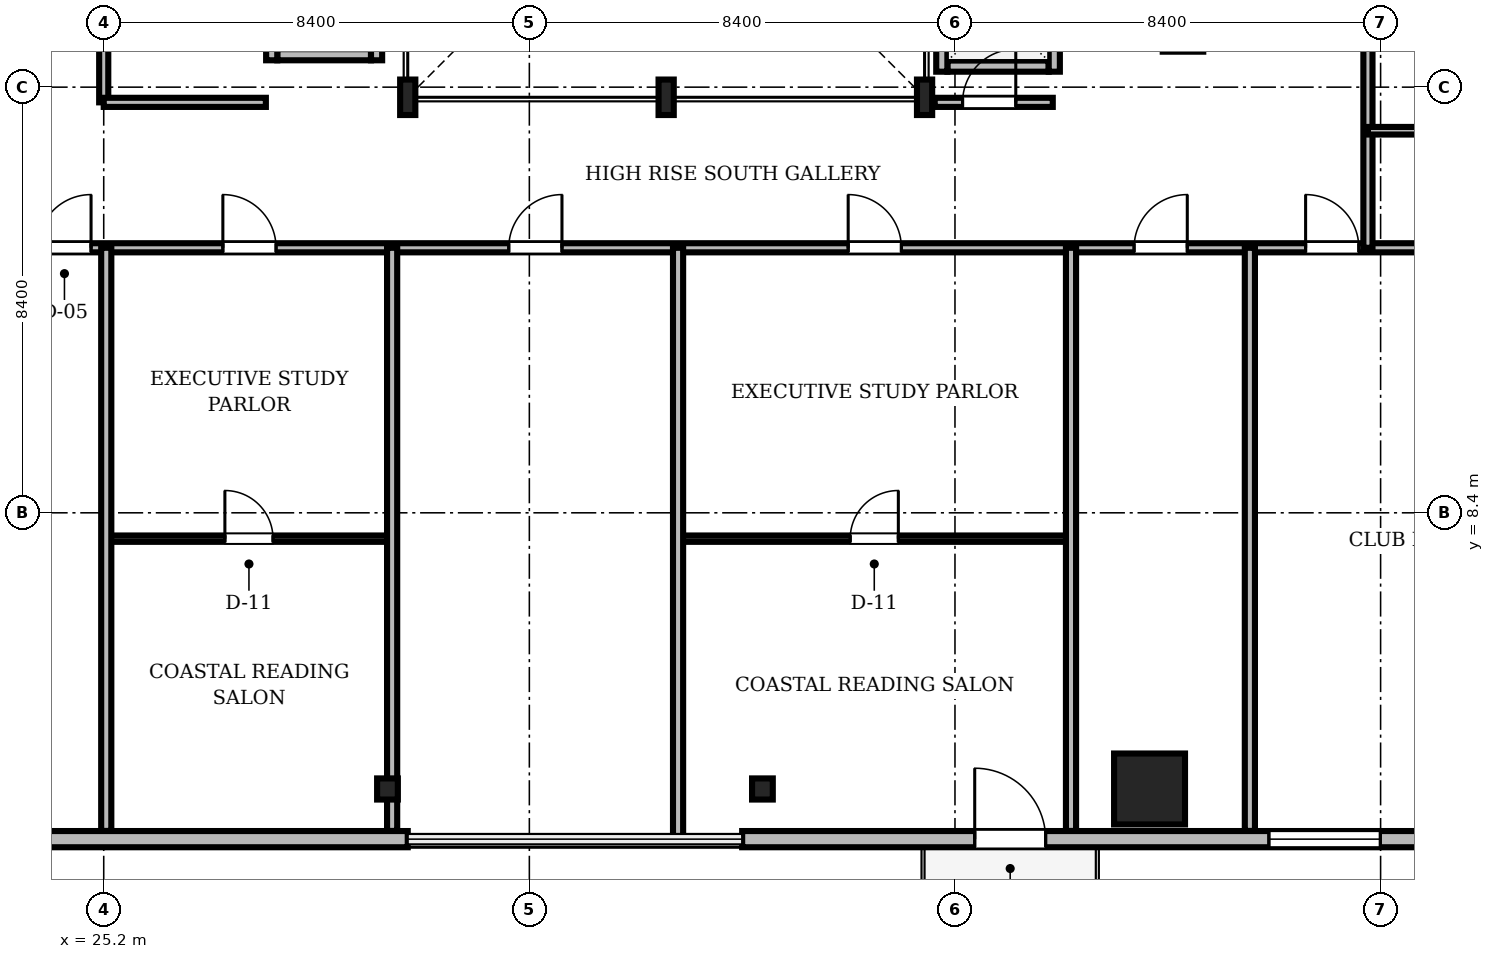
"""IFC4 building model, lengths in metres.
Left out: names, types, materials, properties, quantities, classifications, styles, units other than length and angle.
Written with IfcOpenShell. Run it as: python <this file> out.ifc"""

import sys

from ifc_helpers import new_model, si_unit, direction, frame, frame_2d, origin, origin_2d, place, context, subcontext, project, spatial, rectangle, i_section, extrude, source, transform, mapped, element, fill, save


model = new_model("IFC4")
c1 = context("Model", 3, precision=1e-05, world=origin(), true_north=direction((0.0, 1.0)))
c2 = subcontext(c1, "Body", "Model", "MODEL_VIEW")
j1 = project(units=[si_unit("LENGTHUNIT", "METRE"), si_unit("PLANEANGLEUNIT", "RADIAN")], contexts=[c1])
p1 = place(None, origin())
s1 = spatial("IfcSite", under=j1, at=p1, CompositionType="ELEMENT")
p2 = place(p1, origin())
s2 = spatial("IfcBuilding", under=s1, at=p2, CompositionType="ELEMENT")
p3 = place(p2, frame((0.0, 0.0, 229.8)))
s3 = spatial("IfcBuildingStorey", under=s2, at=p3, CompositionType="ELEMENT", Elevation=229.8)
m1 = source(origin(), c2, "Body", "SweptSolid", [
    extrude(i_section(OverallWidth=0.3, OverallDepth=0.7, WebThickness=0.017, FlangeThickness=0.032, FilletRadius=0.027, at=origin_2d()), origin(), (0.0, 0.0, 1.0), 3.53),
])
for number, where, z_axis, x_axis in (
    (1, (31.2, 16.6, 0.0), (0.0, 0.0, 1.0), (1.0, 0.0, 0.0)),
    (2, (36.3, 16.6, 0.0), (0.0, 0.0, 1.0), (1.0, 0.0, 0.0)),
    (3, (41.4, 16.6, 0.0), (0.0, 0.0, 1.0), (1.0, 0.0, 0.0)),
):
    element("IfcColumn", number, at=place(p3, frame(where, z_axis=z_axis, x_axis=x_axis)), inside=s3, PredefinedType="COLUMN", context=c2, shape_type="MappedRepresentation", body=[
        mapped(m1, transform((0.0, 0.0, 0.0), scale=1.0)),
    ])
m2 = source(origin(), c2, "Body", "SweptSolid", [
    extrude(rectangle(XDim=1.4, YDim=1.4, at=origin_2d()), origin(), (0.0, 0.0, 1.0), 3.53),
])
p4 = place(p3, frame((45.84, 2.95, 0.0), z_axis=(0.0, 0.0, 1.0), x_axis=(1.0, 0.0, 0.0)))
e4 = element("IfcColumn", 4, at=p4, inside=s3, PredefinedType="COLUMN", context=c2, shape_type="MappedRepresentation", body=[
    mapped(m2, transform((0.0, 0.0, 0.0), scale=1.0)),
])
m3 = source(origin(), c2, "Body", "SweptSolid", [
    extrude(i_section(OverallWidth=0.409, OverallDepth=0.417, WebThickness=0.021, FlangeThickness=0.033, FilletRadius=0.015, at=origin_2d()), origin(), (0.0, 0.0, 1.0), 3.53),
])
for number, where, z_axis, x_axis in (
    (5, (30.8, 2.95, 0.0), (0.0, 0.0, 1.0), (1.0, 0.0, 0.0)),
    (6, (38.2, 2.95, 0.0), (0.0, 0.0, 1.0), (1.0, 0.0, 0.0)),
):
    element("IfcColumn", number, at=place(p3, frame(where, z_axis=z_axis, x_axis=x_axis)), inside=s3, PredefinedType="COLUMN", context=c2, shape_type="MappedRepresentation", body=[
        mapped(m3, transform((0.0, 0.0, 0.0), scale=1.0)),
    ])
m4 = source(origin(), c2, "Body", "SweptSolid", [
    extrude(rectangle(XDim=15.6, YDim=0.32, at=frame_2d((7.8, 0.0))), origin(), (0.0, 0.0, 1.0), 3.53),
])
p5 = place(p3, frame((15.6, 1.96, 0.0), z_axis=(0.0, 0.0, 1.0), x_axis=(1.0, 0.0, 0.0)))
e7 = element("IfcWall", 7, at=p5, inside=s3, PredefinedType="SOLIDWALL", context=c2, shape_type="MappedRepresentation", body=[
    mapped(m4, transform((0.0, 0.0, 0.0), scale=1.0)),
])
m5 = source(origin(), c2, "Body", "SweptSolid", [
    extrude(rectangle(XDim=2.2, YDim=2.4, at=frame_2d((1.1, 1.2))), frame((0.0, 0.17, 0.0), z_axis=(0.0, -1.0, 0.0), x_axis=(1.0, 0.0, 0.0)), (0.0, 0.0, 1.0), 0.34),
])
p6 = place(p5, frame((3.005, 0.0, 0.72)))
e8 = element("IfcOpeningElement", 8, at=p6, cuts=e7, PredefinedType="OPENING", context=c2, shape_type="MappedRepresentation", body=[
    mapped(m5, transform((0.0, 0.0, 0.0), scale=1.0)),
])
p7 = place(p3, frame((37.8, 1.96, 0.0), z_axis=(0.0, 0.0, 1.0), x_axis=(1.0, 0.0, 0.0)))
e9 = element("IfcWall", 9, at=p7, inside=s3, PredefinedType="SOLIDWALL", context=c2, shape_type="MappedRepresentation", body=[
    mapped(m4, transform((0.0, 0.0, 0.0), scale=1.0)),
])
m6 = source(origin(), c2, "Body", "SweptSolid", [
    extrude(rectangle(XDim=1.4, YDim=2.3, at=frame_2d((0.7, 1.15))), frame((0.0, 0.17, 0.0), z_axis=(0.0, -1.0, 0.0), x_axis=(1.0, 0.0, 0.0)), (0.0, 0.0, 1.0), 0.34),
])
p8 = place(p7, frame((4.59, 0.0, 0.0)))
e10 = element("IfcOpeningElement", 10, at=p8, cuts=e9, PredefinedType="OPENING", context=c2, shape_type="MappedRepresentation", body=[
    mapped(m6, transform((0.0, 0.0, 0.0), scale=1.0)),
])
p9 = place(p7, frame((10.395, 0.0, 0.72)))
e11 = element("IfcOpeningElement", 11, at=p9, cuts=e9, PredefinedType="OPENING", context=c2, shape_type="MappedRepresentation", body=[
    mapped(m5, transform((0.0, 0.0, 0.0), scale=1.0)),
])
m7 = source(origin(), c2, "Body", "SweptSolid", [
    extrude(rectangle(XDim=2.0, YDim=0.22, at=frame_2d((1.0, 0.0))), origin(), (0.0, 0.0, 1.0), 3.53),
])
p10 = place(p3, frame((41.85, 17.215, 0.0), z_axis=(0.0, 0.0, 1.0), x_axis=(1.0, 0.0, 0.0)))
e12 = element("IfcWall", 12, at=p10, inside=s3, PredefinedType="SOLIDWALL", context=c2, shape_type="MappedRepresentation", body=[
    mapped(m7, transform((0.0, 0.0, 0.0), scale=1.0)),
])
m8 = source(origin(), c2, "Body", "SweptSolid", [
    extrude(rectangle(XDim=2.19, YDim=0.22, at=frame_2d((1.095, 0.0))), origin(), (0.0, 0.0, 1.0), 3.53),
])
p11 = place(p3, frame((41.74, 17.105, 0.0), z_axis=(0.0, 0.0, 1.0), x_axis=(0.0, 1.0, 0.0)))
e13 = element("IfcWall", 13, at=p11, inside=s3, PredefinedType="SOLIDWALL", context=c2, shape_type="MappedRepresentation", body=[
    mapped(m8, transform((0.0, 0.0, 0.0), scale=1.0)),
])
p12 = place(p3, frame((43.96, 17.105, 0.0), z_axis=(0.0, 0.0, 1.0), x_axis=(0.0, 1.0, 0.0)))
e14 = element("IfcWall", 14, at=p12, inside=s3, PredefinedType="SOLIDWALL", context=c2, shape_type="MappedRepresentation", body=[
    mapped(m8, transform((0.0, 0.0, 0.0), scale=1.0)),
])
m9 = source(origin(), c2, "Body", "SweptSolid", [
    extrude(rectangle(XDim=1.1, YDim=2.2, at=frame_2d((0.55, 1.1))), frame((0.0, 0.12, 0.0), z_axis=(0.0, -1.0, 0.0), x_axis=(1.0, 0.0, 0.0)), (0.0, 0.0, 1.0), 0.24),
])
p13 = place(p12, frame((0.545, 0.0, 0.0)))
e15 = element("IfcOpeningElement", 15, at=p13, cuts=e14, PredefinedType="OPENING", context=c2, shape_type="MappedRepresentation", body=[
    mapped(m9, transform((0.0, 0.0, 0.0), scale=1.0)),
])
m10 = source(origin(), c2, "Body", "SweptSolid", [
    extrude(rectangle(XDim=1.85, YDim=0.22, at=frame_2d((0.925, 0.0))), origin(), (0.0, 0.0, 1.0), 2.972),
])
p14 = place(p3, frame((28.625, 17.44, 0.0), z_axis=(0.0, 0.0, 1.0), x_axis=(1.0, 0.0, 0.0)))
e16 = element("IfcWall", 16, at=p14, inside=s3, PredefinedType="SOLIDWALL", context=c2, shape_type="MappedRepresentation", body=[
    mapped(m10, transform((0.0, 0.0, 0.0), scale=1.0)),
])
m11 = source(origin(), c2, "Body", "SweptSolid", [
    extrude(rectangle(XDim=2.54, YDim=0.22, at=frame_2d((1.27, 0.0))), origin(), (0.0, 0.0, 1.0), 2.972),
])
p15 = place(p3, frame((28.515, 17.33, 0.0), z_axis=(0.0, 0.0, 1.0), x_axis=(0.0, 1.0, 0.0)))
e17 = element("IfcWall", 17, at=p15, inside=s3, PredefinedType="SOLIDWALL", context=c2, shape_type="MappedRepresentation", body=[
    mapped(m11, transform((0.0, 0.0, 0.0), scale=1.0)),
])
m12 = source(origin(), c2, "Body", "SweptSolid", [
    extrude(rectangle(XDim=2.54, YDim=0.22, at=frame_2d((1.27, 0.0))), origin(), (0.0, 0.0, 1.0), 3.53),
])
p16 = place(p3, frame((30.585, 17.33, 0.0), z_axis=(0.0, 0.0, 1.0), x_axis=(0.0, 1.0, 0.0)))
e18 = element("IfcWall", 18, at=p16, inside=s3, PredefinedType="SOLIDWALL", context=c2, shape_type="MappedRepresentation", body=[
    mapped(m12, transform((0.0, 0.0, 0.0), scale=1.0)),
])
m13 = source(origin(), c2, "Body", "SweptSolid", [
    extrude(rectangle(XDim=46.156, YDim=0.18, at=frame_2d((23.078, 0.0))), origin(), (0.0, 0.0, 1.0), 2.772),
])
p17 = place(p3, frame((11.422, 13.63, 0.0), z_axis=(0.0, 0.0, 1.0), x_axis=(1.0, 0.0, 0.0)))
e19 = element("IfcWall", 19, at=p17, inside=s3, PredefinedType="PARTITIONING", context=c2, shape_type="MappedRepresentation", body=[
    mapped(m13, transform((0.0, 0.0, 0.0), scale=1.0)),
])
m14 = source(origin(), c2, "Body", "SweptSolid", [
    extrude(rectangle(XDim=1.05, YDim=2.2, at=frame_2d((0.525, 1.1))), frame((0.0, 0.1, 0.0), z_axis=(0.0, -1.0, 0.0), x_axis=(1.0, 0.0, 0.0)), (0.0, 0.0, 1.0), 0.2),
])
p18 = place(p17, frame((12.478, 0.0, 0.0)))
e20 = element("IfcOpeningElement", 20, at=p18, cuts=e19, PredefinedType="OPENING", context=c2, shape_type="MappedRepresentation", body=[
    mapped(m14, transform((0.0, 0.0, 0.0), scale=1.0)),
])
p19 = place(p17, frame((16.129, 0.0, 0.0)))
e21 = element("IfcOpeningElement", 21, at=p19, cuts=e19, PredefinedType="OPENING", context=c2, shape_type="MappedRepresentation", body=[
    mapped(m14, transform((0.0, 0.0, 0.0), scale=1.0)),
])
p20 = place(p17, frame((21.772, 0.0, 0.0)))
e22 = element("IfcOpeningElement", 22, at=p20, cuts=e19, PredefinedType="OPENING", context=c2, shape_type="MappedRepresentation", body=[
    mapped(m14, transform((0.0, 0.0, 0.0), scale=1.0)),
])
p21 = place(p17, frame((28.47, 0.0, 0.0)))
e23 = element("IfcOpeningElement", 23, at=p21, cuts=e19, PredefinedType="OPENING", context=c2, shape_type="MappedRepresentation", body=[
    mapped(m14, transform((0.0, 0.0, 0.0), scale=1.0)),
])
p22 = place(p17, frame((34.113, 0.0, 0.0)))
e24 = element("IfcOpeningElement", 24, at=p22, cuts=e19, PredefinedType="OPENING", context=c2, shape_type="MappedRepresentation", body=[
    mapped(m14, transform((0.0, 0.0, 0.0), scale=1.0)),
])
p23 = place(p17, frame((37.498, 0.0, 0.0)))
e25 = element("IfcOpeningElement", 25, at=p23, cuts=e19, PredefinedType="OPENING", context=c2, shape_type="MappedRepresentation", body=[
    mapped(m14, transform((0.0, 0.0, 0.0), scale=1.0)),
])
m15 = source(origin(), c2, "Body", "SweptSolid", [
    extrude(rectangle(XDim=27.47, YDim=0.18, at=frame_2d((13.735, 0.0))), origin(), (0.0, 0.0, 1.0), 2.972),
])
p24 = place(p3, frame((50.15, 13.63, 0.0), z_axis=(0.0, 0.0, 1.0), x_axis=(0.0, 1.0, 0.0)))
e26 = element("IfcWall", 26, at=p24, inside=s3, PredefinedType="PARTITIONING", context=c2, shape_type="MappedRepresentation", body=[
    mapped(m15, transform((0.0, 0.0, 0.0), scale=1.0)),
])
p25 = place(p24, frame((4.071, 0.0, 0.0)))
e27 = element("IfcOpeningElement", 27, at=p25, cuts=e26, PredefinedType="OPENING", context=c2, shape_type="MappedRepresentation", body=[
    mapped(m14, transform((0.0, 0.0, 0.0), scale=1.0)),
])
p26 = place(p24, frame((10.884, 0.0, 0.0)))
e28 = element("IfcOpeningElement", 28, at=p26, cuts=e26, PredefinedType="OPENING", context=c2, shape_type="MappedRepresentation", body=[
    mapped(m14, transform((0.0, 0.0, 0.0), scale=1.0)),
])
p27 = place(p24, frame((17.696, 0.0, 0.0)))
e29 = element("IfcOpeningElement", 29, at=p27, cuts=e26, PredefinedType="OPENING", context=c2, shape_type="MappedRepresentation", body=[
    mapped(m14, transform((0.0, 0.0, 0.0), scale=1.0)),
])
p28 = place(p24, frame((24.509, 0.0, 0.0)))
e30 = element("IfcOpeningElement", 30, at=p28, cuts=e26, PredefinedType="OPENING", context=c2, shape_type="MappedRepresentation", body=[
    mapped(m14, transform((0.0, 0.0, 0.0), scale=1.0)),
])
m16 = source(origin(), c2, "Body", "SweptSolid", [
    extrude(rectangle(XDim=7.755, YDim=0.125, at=frame_2d((3.877, 0.0))), origin(), (0.0, 0.0, 1.0), 2.972),
])
p29 = place(p3, frame((36.535, 7.89, 0.0), z_axis=(0.0, 0.0, 1.0), x_axis=(1.0, 0.0, 0.0)))
e31 = element("IfcWall", 31, at=p29, inside=s3, PredefinedType="PARTITIONING", context=c2, shape_type="MappedRepresentation", body=[
    mapped(m16, transform((0.0, 0.0, 0.0), scale=1.0)),
])
m17 = source(origin(), c2, "Body", "SweptSolid", [
    extrude(rectangle(XDim=0.95, YDim=2.15, at=frame_2d((0.475, 1.075))), frame((0.0, 0.073, 0.0), z_axis=(0.0, -1.0, 0.0), x_axis=(1.0, 0.0, 0.0)), (0.0, 0.0, 1.0), 0.145),
])
p30 = place(p29, frame((3.397, 0.0, 0.0)))
e32 = element("IfcOpeningElement", 32, at=p30, cuts=e31, PredefinedType="OPENING", context=c2, shape_type="MappedRepresentation", body=[
    mapped(m17, transform((0.0, 0.0, 0.0), scale=1.0)),
])
m18 = source(origin(), c2, "Body", "SweptSolid", [
    extrude(rectangle(XDim=5.642, YDim=0.125, at=frame_2d((2.821, 0.0))), origin(), (0.0, 0.0, 1.0), 2.972),
])
p31 = place(p3, frame((25.25, 7.89, 0.0), z_axis=(0.0, 0.0, 1.0), x_axis=(1.0, 0.0, 0.0)))
e33 = element("IfcWall", 33, at=p31, inside=s3, PredefinedType="PARTITIONING", context=c2, shape_type="MappedRepresentation", body=[
    mapped(m18, transform((0.0, 0.0, 0.0), scale=1.0)),
])
p32 = place(p31, frame((2.341, 0.0, 0.0)))
e34 = element("IfcOpeningElement", 34, at=p32, cuts=e33, PredefinedType="OPENING", context=c2, shape_type="MappedRepresentation", body=[
    mapped(m17, transform((0.0, 0.0, 0.0), scale=1.0)),
])
m19 = source(origin(), c2, "Body", "SweptSolid", [
    extrude(rectangle(XDim=3.55, YDim=0.18, at=frame_2d((1.775, 0.0))), origin(), (0.0, 0.0, 1.0), 2.972),
])
p33 = place(p3, frame((25.2, 16.5, 0.0), z_axis=(0.0, 0.0, 1.0), x_axis=(0.0, 1.0, 0.0)))
e35 = element("IfcWall", 35, at=p33, inside=s3, PredefinedType="PARTITIONING", context=c2, shape_type="MappedRepresentation", body=[
    mapped(m19, transform((0.0, 0.0, 0.0), scale=1.0)),
])
p34 = place(p33, frame((1.15, 0.0, 0.0)))
e36 = element("IfcOpeningElement", 36, at=p34, cuts=e35, PredefinedType="OPENING", context=c2, shape_type="MappedRepresentation", body=[
    mapped(m14, transform((0.0, 0.0, 0.0), scale=1.0)),
])
m20 = source(origin(), c2, "Body", "SweptSolid", [
    extrude(rectangle(XDim=2.33, YDim=0.18, at=frame_2d((1.165, 0.0))), origin(), (0.0, 0.0, 1.0), 2.972),
])
p35 = place(p3, frame((41.6, 16.5, 0.0), z_axis=(0.0, 0.0, 1.0), x_axis=(1.0, 0.0, 0.0)))
e37 = element("IfcWall", 37, at=p35, inside=s3, PredefinedType="PARTITIONING", context=c2, shape_type="MappedRepresentation", body=[
    mapped(m20, transform((0.0, 0.0, 0.0), scale=1.0)),
])
p36 = place(p35, frame((0.55, 0.0, 0.0)))
e38 = element("IfcOpeningElement", 38, at=p36, cuts=e37, PredefinedType="OPENING", context=c2, shape_type="MappedRepresentation", body=[
    mapped(m14, transform((0.0, 0.0, 0.0), scale=1.0)),
])
m21 = source(origin(), c2, "Body", "SweptSolid", [
    extrude(rectangle(XDim=11.508, YDim=0.2, at=frame_2d((5.754, 0.0))), origin(), (0.0, 0.0, 1.0), 2.772),
])
for number, where, z_axis, x_axis in (
    (39, (25.25, 2.122, 0.0), (0.0, 0.0, 1.0), (0.0, 1.0, 0.0)),
    (40, (30.892, 2.122, 0.0), (0.0, 0.0, 1.0), (0.0, 1.0, 0.0)),
):
    element("IfcWall", number, at=place(p3, frame(where, z_axis=z_axis, x_axis=x_axis)), inside=s3, PredefinedType="PARTITIONING", context=c2, shape_type="MappedRepresentation", body=[
        mapped(m21, transform((0.0, 0.0, 0.0), scale=1.0)),
    ])
m22 = source(origin(), c2, "Body", "SweptSolid", [
    extrude(rectangle(XDim=11.7, YDim=0.2, at=frame_2d((5.85, 0.0))), origin(), (0.0, 0.0, 1.0), 2.772),
])
p37 = place(p3, frame((36.535, 1.93, 0.0), z_axis=(0.0, 0.0, 1.0), x_axis=(0.0, 1.0, 0.0)))
e41 = element("IfcWall", 41, at=p37, inside=s3, PredefinedType="PARTITIONING", context=c2, shape_type="MappedRepresentation", body=[
    mapped(m22, transform((0.0, 0.0, 0.0), scale=1.0)),
])
for number, where, z_axis, x_axis in (
    (42, (44.29, 2.122, 0.0), (0.0, 0.0, 1.0), (0.0, 1.0, 0.0)),
    (43, (47.82, 2.122, 0.0), (0.0, 0.0, 1.0), (0.0, 1.0, 0.0)),
):
    element("IfcWall", number, at=place(p3, frame(where, z_axis=z_axis, x_axis=x_axis)), inside=s3, PredefinedType="PARTITIONING", context=c2, shape_type="MappedRepresentation", body=[
        mapped(m21, transform((0.0, 0.0, 0.0), scale=1.0)),
    ])
m23 = source(origin(), c2, "Body", "SweptSolid", [
    extrude(rectangle(XDim=3.2, YDim=0.18, at=frame_2d((1.6, 0.0))), origin(), (0.0, 0.0, 1.0), 3.53),
])
p38 = place(p3, frame((25.2, 16.5, 0.0), z_axis=(0.0, 0.0, 1.0), x_axis=(1.0, 0.0, 0.0)))
e44 = element("IfcWall", 44, at=p38, inside=s3, PredefinedType="PARTITIONING", context=c2, shape_type="MappedRepresentation", body=[
    mapped(m23, transform((0.0, 0.0, 0.0), scale=1.0)),
])
m24 = source(origin(), c2, "Body", "SweptSolid", [
    extrude(rectangle(XDim=2.36, YDim=0.15, at=frame_2d((1.18, 0.0))), origin(), (0.0, 0.0, 1.0), 3.53),
])
p39 = place(p3, frame((50.15, 15.94, 0.0), z_axis=(0.0, 0.0, 1.0), x_axis=(1.0, 0.0, 0.0)))
e45 = element("IfcWall", 45, at=p39, inside=s3, PredefinedType="PARTITIONING", context=c2, shape_type="MappedRepresentation", body=[
    mapped(m24, transform((0.0, 0.0, 0.0), scale=1.0)),
])
m25 = source(origin(), c2, "Body", "SweptSolid", [
    extrude(rectangle(XDim=1.4, YDim=2.3, at=frame_2d((0.7, 1.15))), frame((0.0, 0.025, 0.0), z_axis=(0.0, -1.0, 0.0), x_axis=(1.0, 0.0, 0.0)), (0.0, 0.0, 1.0), 0.05),
])
p40 = place(p8, frame((1.4, 0.0, 0.0), z_axis=(0.0, 0.0, 1.0), x_axis=(-1.0, 0.0, 0.0)))
e46 = element("IfcDoor", 46, at=p40, inside=s3, OperationType="DOUBLE_DOOR_SLIDING", PredefinedType="DOOR", context=c2, shape_type="MappedRepresentation", body=[
    mapped(m25, transform((0.0, 0.0, 0.0), scale=1.0)),
])
fill(e10, e46)
m26 = source(origin(), c2, "Body", "SweptSolid", [
    extrude(rectangle(XDim=2.2, YDim=2.4, at=frame_2d((1.1, 1.2))), frame((0.0, 0.03, 0.0), z_axis=(0.0, -1.0, 0.0), x_axis=(1.0, 0.0, 0.0)), (0.0, 0.0, 1.0), 0.06),
])
p41 = place(p9, origin())
e47 = element("IfcWindow", 47, at=p41, inside=s3, PartitioningType="SINGLE_PANEL", PredefinedType="WINDOW", context=c2, shape_type="MappedRepresentation", body=[
    mapped(m26, transform((0.0, 0.0, 0.0), scale=1.0)),
])
fill(e11, e47)
m27 = source(origin(), c2, "Body", "SweptSolid", [
    extrude(rectangle(XDim=1.05, YDim=2.2, at=frame_2d((0.525, 1.1))), frame((0.0, 0.025, 0.0), z_axis=(0.0, -1.0, 0.0), x_axis=(1.0, 0.0, 0.0)), (0.0, 0.0, 1.0), 0.05),
])
p42 = place(p18, origin())
e48 = element("IfcDoor", 48, at=p42, inside=s3, OperationType="SINGLE_SWING_RIGHT", PredefinedType="DOOR", context=c2, shape_type="MappedRepresentation", body=[
    mapped(m27, transform((0.0, 0.0, 0.0), scale=1.0)),
])
fill(e20, e48)
p43 = place(p19, origin())
e49 = element("IfcDoor", 49, at=p43, inside=s3, OperationType="SINGLE_SWING_LEFT", PredefinedType="DOOR", context=c2, shape_type="MappedRepresentation", body=[
    mapped(m27, transform((0.0, 0.0, 0.0), scale=1.0)),
])
fill(e21, e49)
p44 = place(p20, origin())
e50 = element("IfcDoor", 50, at=p44, inside=s3, OperationType="SINGLE_SWING_RIGHT", PredefinedType="DOOR", context=c2, shape_type="MappedRepresentation", body=[
    mapped(m27, transform((0.0, 0.0, 0.0), scale=1.0)),
])
fill(e22, e50)
p45 = place(p21, origin())
e51 = element("IfcDoor", 51, at=p45, inside=s3, OperationType="SINGLE_SWING_LEFT", PredefinedType="DOOR", context=c2, shape_type="MappedRepresentation", body=[
    mapped(m27, transform((0.0, 0.0, 0.0), scale=1.0)),
])
fill(e23, e51)
p46 = place(p22, origin())
e52 = element("IfcDoor", 52, at=p46, inside=s3, OperationType="SINGLE_SWING_RIGHT", PredefinedType="DOOR", context=c2, shape_type="MappedRepresentation", body=[
    mapped(m27, transform((0.0, 0.0, 0.0), scale=1.0)),
])
fill(e24, e52)
p47 = place(p23, origin())
e53 = element("IfcDoor", 53, at=p47, inside=s3, OperationType="SINGLE_SWING_LEFT", PredefinedType="DOOR", context=c2, shape_type="MappedRepresentation", body=[
    mapped(m27, transform((0.0, 0.0, 0.0), scale=1.0)),
])
fill(e25, e53)
m28 = source(origin(), c2, "Body", "SweptSolid", [
    extrude(rectangle(XDim=0.95, YDim=2.15, at=frame_2d((0.475, 1.075))), frame((0.0, 0.025, 0.0), z_axis=(0.0, -1.0, 0.0), x_axis=(1.0, 0.0, 0.0)), (0.0, 0.0, 1.0), 0.05),
])
p48 = place(p30, origin())
e54 = element("IfcDoor", 54, at=p48, inside=s3, OperationType="SINGLE_SWING_RIGHT", PredefinedType="DOOR", context=c2, shape_type="MappedRepresentation", body=[
    mapped(m28, transform((0.0, 0.0, 0.0), scale=1.0)),
])
fill(e32, e54)
p49 = place(p32, origin())
e55 = element("IfcDoor", 55, at=p49, inside=s3, OperationType="SINGLE_SWING_LEFT", PredefinedType="DOOR", context=c2, shape_type="MappedRepresentation", body=[
    mapped(m28, transform((0.0, 0.0, 0.0), scale=1.0)),
])
fill(e34, e55)
p50 = place(p36, origin())
e56 = element("IfcDoor", 56, at=p50, inside=s3, OperationType="SINGLE_SWING_RIGHT", PredefinedType="DOOR", context=c2, shape_type="MappedRepresentation", body=[
    mapped(m27, transform((0.0, 0.0, 0.0), scale=1.0)),
])
fill(e38, e56)
save(model, sys.argv[1])
